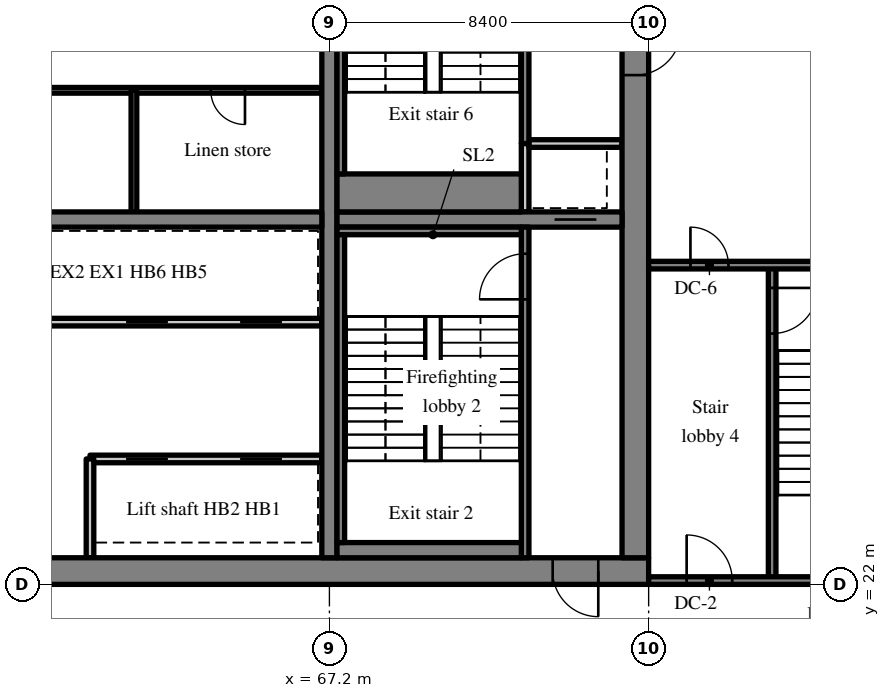
"""IFC4 building model, lengths in metres.
Left out: names, types, materials, properties, quantities, classifications, styles, units other than length and angle.
Written with IfcOpenShell. Run it as: python <this file> out.ifc"""

import sys

from ifc_helpers import new_model, si_unit, direction, frame, frame_2d, origin, place, context, subcontext, project, spatial, rectangle, extrude, source, transform, mapped, element, fill, save


model = new_model("IFC4")
c1 = context("Model", 3, precision=1e-05, world=origin(), true_north=direction((0.0, 1.0)))
c2 = subcontext(c1, "Body", "Model", "MODEL_VIEW")
j1 = project(units=[si_unit("LENGTHUNIT", "METRE"), si_unit("PLANEANGLEUNIT", "RADIAN")], contexts=[c1])
p1 = place(None, origin())
s1 = spatial("IfcSite", under=j1, at=p1, CompositionType="ELEMENT")
p2 = place(p1, origin())
s2 = spatial("IfcBuilding", under=s1, at=p2, CompositionType="ELEMENT")
p3 = place(p2, frame((0.0, 0.0, 189.6)))
s3 = spatial("IfcBuildingStorey", under=s2, at=p3, CompositionType="ELEMENT", Elevation=189.6)
m1 = source(origin(), c2, "Body", "SweptSolid", [
    extrude(rectangle(XDim=50.4, YDim=0.7, at=frame_2d((25.2, 0.0))), origin(), (0.0, 0.0, 1.0), 3.52),
])
p4 = place(p3, frame((25.2, 22.35, 0.0), z_axis=(0.0, 0.0, 1.0), x_axis=(1.0, 0.0, 0.0)))
e1 = element("IfcWall", 1, at=p4, inside=s3, PredefinedType="SHEAR", context=c2, shape_type="MappedRepresentation", body=[
    mapped(m1, transform((0.0, 0.0, 0.0), scale=1.0)),
])
m2 = source(origin(), c2, "Body", "SweptSolid", [
    extrude(rectangle(XDim=1.8, YDim=2.1, at=frame_2d((0.9, 1.05))), frame((0.0, 0.36, 0.0), z_axis=(0.0, -1.0, 0.0), x_axis=(1.0, 0.0, 0.0)), (0.0, 0.0, 1.0), 0.72),
])
p5 = place(p4, frame((15.9, 0.0, 0.0)))
e2 = element("IfcOpeningElement", 2, at=p5, cuts=e1, PredefinedType="OPENING", context=c2, shape_type="MappedRepresentation", body=[
    mapped(m2, transform((0.0, 0.0, 0.0), scale=1.0)),
])
m3 = source(origin(), c2, "Body", "SweptSolid", [
    extrude(rectangle(XDim=0.9, YDim=2.1, at=frame_2d((0.45, 1.05))), frame((0.0, 0.36, 0.0), z_axis=(0.0, -1.0, 0.0), x_axis=(1.0, 0.0, 0.0)), (0.0, 0.0, 1.0), 0.72),
])
p6 = place(p4, frame((9.7, 0.0, 0.0)))
e3 = element("IfcOpeningElement", 3, at=p6, cuts=e1, PredefinedType="OPENING", context=c2, shape_type="MappedRepresentation", body=[
    mapped(m3, transform((0.0, 0.0, 0.0), scale=1.0)),
])
p7 = place(p4, frame((21.5, 0.0, 0.0)))
e4 = element("IfcOpeningElement", 4, at=p7, cuts=e1, PredefinedType="OPENING", context=c2, shape_type="MappedRepresentation", body=[
    mapped(m3, transform((0.0, 0.0, 0.0), scale=1.0)),
])
p8 = place(p4, frame((32.7, 0.0, 0.0)))
e5 = element("IfcOpeningElement", 5, at=p8, cuts=e1, PredefinedType="OPENING", context=c2, shape_type="MappedRepresentation", body=[
    mapped(m2, transform((0.0, 0.0, 0.0), scale=1.0)),
])
m4 = source(origin(), c2, "Body", "SweptSolid", [
    extrude(rectangle(XDim=1.2, YDim=2.1, at=frame_2d((0.6, 1.05))), frame((0.0, 0.36, 0.0), z_axis=(0.0, -1.0, 0.0), x_axis=(1.0, 0.0, 0.0)), (0.0, 0.0, 1.0), 0.72),
])
p9 = place(p4, frame((6.475, 0.0, 0.0)))
e6 = element("IfcOpeningElement", 6, at=p9, cuts=e1, PredefinedType="OPENING", context=c2, shape_type="MappedRepresentation", body=[
    mapped(m4, transform((0.0, 0.0, 0.0), scale=1.0)),
])
p10 = place(p4, frame((47.875, 0.0, 0.0)))
e7 = element("IfcOpeningElement", 7, at=p10, cuts=e1, PredefinedType="OPENING", context=c2, shape_type="MappedRepresentation", body=[
    mapped(m4, transform((0.0, 0.0, 0.0), scale=1.0)),
])
m5 = source(origin(), c2, "Body", "SweptSolid", [
    extrude(rectangle(XDim=18.6, YDim=0.7, at=frame_2d((9.3, 0.0))), origin(), (0.0, 0.0, 1.0), 3.52),
])
p11 = place(p3, frame((75.25, 22.7, 0.0), z_axis=(0.0, 0.0, 1.0), x_axis=(0.0, 1.0, 0.0)))
e8 = element("IfcWall", 8, at=p11, inside=s3, PredefinedType="SHEAR", context=c2, shape_type="MappedRepresentation", body=[
    mapped(m5, transform((0.0, 0.0, 0.0), scale=1.0)),
])
p12 = place(p11, frame((12.7, 0.0, 0.0)))
e9 = element("IfcOpeningElement", 9, at=p12, cuts=e8, PredefinedType="OPENING", context=c2, shape_type="MappedRepresentation", body=[
    mapped(m4, transform((0.0, 0.0, 0.0), scale=1.0)),
])
m6 = source(origin(), c2, "Body", "SweptSolid", [
    extrude(rectangle(XDim=18.6, YDim=0.4, at=frame_2d((9.3, 0.0))), origin(), (0.0, 0.0, 1.0), 3.52),
])
p13 = place(p3, frame((67.2, 22.7, 0.0), z_axis=(0.0, 0.0, 1.0), x_axis=(0.0, 1.0, 0.0)))
e10 = element("IfcWall", 10, at=p13, inside=s3, PredefinedType="SHEAR", context=c2, shape_type="MappedRepresentation", body=[
    mapped(m6, transform((0.0, 0.0, 0.0), scale=1.0)),
])
m7 = source(origin(), c2, "Body", "SweptSolid", [
    extrude(rectangle(XDim=16.4, YDim=0.4, at=frame_2d((8.2, 0.0))), origin(), (0.0, 0.0, 1.0), 3.52),
])
p14 = place(p3, frame((50.6, 31.6, 0.0), z_axis=(0.0, 0.0, 1.0), x_axis=(1.0, 0.0, 0.0)))
e11 = element("IfcWall", 11, at=p14, inside=s3, PredefinedType="SHEAR", context=c2, shape_type="MappedRepresentation", body=[
    mapped(m7, transform((0.0, 0.0, 0.0), scale=1.0)),
])
m8 = source(origin(), c2, "Body", "SweptSolid", [
    extrude(rectangle(XDim=1.0, YDim=2.1, at=frame_2d((0.5, 1.05))), frame((0.0, 0.21, 0.0), z_axis=(0.0, -1.0, 0.0), x_axis=(1.0, 0.0, 0.0)), (0.0, 0.0, 1.0), 0.42),
])
p15 = place(p14, frame((0.6, 0.0, 0.0)))
e12 = element("IfcOpeningElement", 12, at=p15, cuts=e11, PredefinedType="OPENING", context=c2, shape_type="MappedRepresentation", body=[
    mapped(m8, transform((0.0, 0.0, 0.0), scale=1.0)),
])
m9 = source(origin(), c2, "Body", "SweptSolid", [
    extrude(rectangle(XDim=7.5, YDim=0.4, at=frame_2d((3.75, 0.0))), origin(), (0.0, 0.0, 1.0), 3.52),
])
p16 = place(p3, frame((67.4, 31.6, 0.0), z_axis=(0.0, 0.0, 1.0), x_axis=(1.0, 0.0, 0.0)))
e13 = element("IfcWall", 13, at=p16, inside=s3, PredefinedType="SHEAR", context=c2, shape_type="MappedRepresentation", body=[
    mapped(m9, transform((0.0, 0.0, 0.0), scale=1.0)),
])
m10 = source(origin(), c2, "Body", "SweptSolid", [
    extrude(rectangle(XDim=1.1, YDim=2.1, at=frame_2d((0.55, 1.05))), frame((0.0, 0.21, 0.0), z_axis=(0.0, -1.0, 0.0), x_axis=(1.0, 0.0, 0.0)), (0.0, 0.0, 1.0), 0.42),
])
p17 = place(p16, frame((5.725, 0.0, 0.0)))
e14 = element("IfcOpeningElement", 14, at=p17, cuts=e13, PredefinedType="OPENING", context=c2, shape_type="MappedRepresentation", body=[
    mapped(m10, transform((0.0, 0.0, 0.0), scale=1.0)),
])
m11 = source(origin(), c2, "Body", "SweptSolid", [
    extrude(rectangle(XDim=6.1, YDim=0.2, at=frame_2d((3.05, 0.0))), origin(), (0.0, 0.0, 1.0), 3.52),
])
p18 = place(p3, frame((67.0, 25.3, 0.0), z_axis=(0.0, 0.0, 1.0), x_axis=(-1.0, 0.0, 0.0)))
e15 = element("IfcWall", 15, at=p18, inside=s3, PredefinedType="SOLIDWALL", context=c2, shape_type="MappedRepresentation", body=[
    mapped(m11, transform((0.0, 0.0, 0.0), scale=1.0)),
])
m12 = source(origin(), c2, "Body", "SweptSolid", [
    extrude(rectangle(XDim=1.1, YDim=2.1, at=frame_2d((0.55, 1.05))), frame((0.0, 0.11, 0.0), z_axis=(0.0, -1.0, 0.0), x_axis=(1.0, 0.0, 0.0)), (0.0, 0.0, 1.0), 0.22),
])
p19 = place(p18, frame((1.05, 0.0, 0.0)))
e16 = element("IfcOpeningElement", 16, at=p19, cuts=e15, PredefinedType="OPENING", context=c2, shape_type="MappedRepresentation", body=[
    mapped(m12, transform((0.0, 0.0, 0.0), scale=1.0)),
])
p20 = place(p18, frame((4.05, 0.0, 0.0)))
e17 = element("IfcOpeningElement", 17, at=p20, cuts=e15, PredefinedType="OPENING", context=c2, shape_type="MappedRepresentation", body=[
    mapped(m12, transform((0.0, 0.0, 0.0), scale=1.0)),
])
m13 = source(origin(), c2, "Body", "SweptSolid", [
    extrude(rectangle(XDim=12.1, YDim=0.2, at=frame_2d((6.05, 0.0))), origin(), (0.0, 0.0, 1.0), 3.52),
])
p21 = place(p3, frame((67.0, 28.9, 0.0), z_axis=(0.0, 0.0, 1.0), x_axis=(-1.0, 0.0, 0.0)))
e18 = element("IfcWall", 18, at=p21, inside=s3, PredefinedType="SOLIDWALL", context=c2, shape_type="MappedRepresentation", body=[
    mapped(m13, transform((0.0, 0.0, 0.0), scale=1.0)),
])
p22 = place(p21, frame((1.05, 0.0, 0.0)))
e19 = element("IfcOpeningElement", 19, at=p22, cuts=e18, PredefinedType="OPENING", context=c2, shape_type="MappedRepresentation", body=[
    mapped(m12, transform((0.0, 0.0, 0.0), scale=1.0)),
])
p23 = place(p21, frame((4.05, 0.0, 0.0)))
e20 = element("IfcOpeningElement", 20, at=p23, cuts=e18, PredefinedType="OPENING", context=c2, shape_type="MappedRepresentation", body=[
    mapped(m12, transform((0.0, 0.0, 0.0), scale=1.0)),
])
m14 = source(origin(), c2, "Body", "SweptSolid", [
    extrude(rectangle(XDim=2.6, YDim=0.2, at=frame_2d((1.3, 0.0))), origin(), (0.0, 0.0, 1.0), 3.52),
])
p24 = place(p3, frame((60.9, 22.7, 0.0), z_axis=(0.0, 0.0, 1.0), x_axis=(0.0, 1.0, 0.0)))
e21 = element("IfcWall", 21, at=p24, inside=s3, PredefinedType="SOLIDWALL", context=c2, shape_type="MappedRepresentation", body=[
    mapped(m14, transform((0.0, 0.0, 0.0), scale=1.0)),
])
m15 = source(origin(), c2, "Body", "SweptSolid", [
    extrude(rectangle(XDim=14.2, YDim=0.15, at=frame_2d((7.1, 0.0))), origin(), (0.0, 0.0, 1.0), 3.52),
])
p25 = place(p3, frame((67.0, 35.0, 0.0), z_axis=(0.0, 0.0, 1.0), x_axis=(-1.0, 0.0, 0.0)))
e22 = element("IfcWall", 22, at=p25, inside=s3, PredefinedType="PARTITIONING", context=c2, shape_type="MappedRepresentation", body=[
    mapped(m15, transform((0.0, 0.0, 0.0), scale=1.0)),
])
m16 = source(origin(), c2, "Body", "SweptSolid", [
    extrude(rectangle(XDim=0.9, YDim=2.1, at=frame_2d((0.45, 1.05))), frame((0.0, 0.085, 0.0), z_axis=(0.0, -1.0, 0.0), x_axis=(1.0, 0.0, 0.0)), (0.0, 0.0, 1.0), 0.17),
])
p26 = place(p25, frame((2.022, 0.0, 0.0)))
e23 = element("IfcOpeningElement", 23, at=p26, cuts=e22, PredefinedType="OPENING", context=c2, shape_type="MappedRepresentation", body=[
    mapped(m16, transform((0.0, 0.0, 0.0), scale=1.0)),
])
p27 = place(p25, frame((9.084, 0.0, 0.0)))
e24 = element("IfcOpeningElement", 24, at=p27, cuts=e22, PredefinedType="OPENING", context=c2, shape_type="MappedRepresentation", body=[
    mapped(m16, transform((0.0, 0.0, 0.0), scale=1.0)),
])
m17 = source(origin(), c2, "Body", "SweptSolid", [
    extrude(rectangle(XDim=3.2, YDim=0.15, at=frame_2d((1.6, 0.0))), origin(), (0.0, 0.0, 1.0), 3.52),
])
p28 = place(p3, frame((62.056, 31.8, 0.0), z_axis=(0.0, 0.0, 1.0), x_axis=(0.0, 1.0, 0.0)))
e25 = element("IfcWall", 25, at=p28, inside=s3, PredefinedType="PARTITIONING", context=c2, shape_type="MappedRepresentation", body=[
    mapped(m17, transform((0.0, 0.0, 0.0), scale=1.0)),
])
m18 = source(origin(), c2, "Body", "SweptSolid", [
    extrude(rectangle(XDim=8.7, YDim=0.2, at=frame_2d((4.35, 0.0))), origin(), (0.0, 0.0, 1.0), 3.52),
])
p29 = place(p3, frame((72.35, 22.7, 0.0), z_axis=(0.0, 0.0, 1.0), x_axis=(0.0, 1.0, 0.0)))
e26 = element("IfcWall", 26, at=p29, inside=s3, PredefinedType="SOLIDWALL", context=c2, shape_type="MappedRepresentation", body=[
    mapped(m18, transform((0.0, 0.0, 0.0), scale=1.0)),
])
m19 = source(origin(), c2, "Body", "SweptSolid", [
    extrude(rectangle(XDim=1.2, YDim=2.1, at=frame_2d((0.6, 1.05))), frame((0.0, 0.11, 0.0), z_axis=(0.0, -1.0, 0.0), x_axis=(1.0, 0.0, 0.0)), (0.0, 0.0, 1.0), 0.22),
])
p30 = place(p29, frame((6.8, 0.0, 0.0)))
e27 = element("IfcOpeningElement", 27, at=p30, cuts=e26, PredefinedType="OPENING", context=c2, shape_type="MappedRepresentation", body=[
    mapped(m19, transform((0.0, 0.0, 0.0), scale=1.0)),
])
m20 = source(origin(), c2, "Body", "SweptSolid", [
    extrude(rectangle(XDim=1.8, YDim=0.2, at=frame_2d((0.9, 0.0))), origin(), (0.0, 0.0, 1.0), 3.52),
])
p31 = place(p3, frame((72.35, 31.8, 0.0), z_axis=(0.0, 0.0, 1.0), x_axis=(0.0, 1.0, 0.0)))
e28 = element("IfcWall", 28, at=p31, inside=s3, PredefinedType="SOLIDWALL", context=c2, shape_type="MappedRepresentation", body=[
    mapped(m20, transform((0.0, 0.0, 0.0), scale=1.0)),
])
m21 = source(origin(), c2, "Body", "SweptSolid", [
    extrude(rectangle(XDim=2.45, YDim=0.2, at=frame_2d((1.225, 0.0))), origin(), (0.0, 0.0, 1.0), 3.52),
])
p32 = place(p3, frame((72.45, 33.6, 0.0), z_axis=(0.0, 0.0, 1.0), x_axis=(1.0, 0.0, 0.0)))
e29 = element("IfcWall", 29, at=p32, inside=s3, PredefinedType="SOLIDWALL", context=c2, shape_type="MappedRepresentation", body=[
    mapped(m21, transform((0.0, 0.0, 0.0), scale=1.0)),
])
m22 = source(origin(), c2, "Body", "SweptSolid", [
    extrude(rectangle(XDim=7.7, YDim=0.2, at=frame_2d((3.85, 0.0))), origin(), (0.0, 0.0, 1.0), 3.52),
])
p33 = place(p3, frame((72.35, 33.6, 0.0), z_axis=(0.0, 0.0, 1.0), x_axis=(0.0, 1.0, 0.0)))
e30 = element("IfcWall", 30, at=p33, inside=s3, PredefinedType="SOLIDWALL", context=c2, shape_type="MappedRepresentation", body=[
    mapped(m22, transform((0.0, 0.0, 0.0), scale=1.0)),
])
m23 = source(origin(), c2, "Body", "SweptSolid", [
    extrude(rectangle(XDim=1.8, YDim=2.1, at=frame_2d((0.9, 1.05))), frame((0.0, 0.11, 0.0), z_axis=(0.0, -1.0, 0.0), x_axis=(1.0, 0.0, 0.0)), (0.0, 0.0, 1.0), 0.22),
])
p34 = place(p33, frame((5.3, 0.0, 0.0)))
e31 = element("IfcOpeningElement", 31, at=p34, cuts=e30, PredefinedType="OPENING", context=c2, shape_type="MappedRepresentation", body=[
    mapped(m23, transform((0.0, 0.0, 0.0), scale=1.0)),
])
m24 = source(origin(), c2, "Body", "SweptSolid", [
    extrude(rectangle(XDim=8.3, YDim=0.2, at=frame_2d((4.15, 0.0))), origin(), (0.0, 0.0, 1.0), 3.52),
])
p35 = place(p3, frame((78.85, 22.1, 0.0), z_axis=(0.0, 0.0, 1.0), x_axis=(0.0, 1.0, 0.0)))
e32 = element("IfcWall", 32, at=p35, inside=s3, PredefinedType="SOLIDWALL", context=c2, shape_type="MappedRepresentation", body=[
    mapped(m24, transform((0.0, 0.0, 0.0), scale=1.0)),
])
p36 = place(p35, frame((6.5, 0.0, 0.0)))
e33 = element("IfcOpeningElement", 33, at=p36, cuts=e32, PredefinedType="OPENING", context=c2, shape_type="MappedRepresentation", body=[
    mapped(m19, transform((0.0, 0.0, 0.0), scale=1.0)),
])
m25 = source(origin(), c2, "Body", "SweptSolid", [
    extrude(rectangle(XDim=8.25, YDim=0.2, at=frame_2d((4.125, 0.0))), origin(), (0.0, 0.0, 1.0), 3.52),
])
p37 = place(p3, frame((83.85, 22.1, 0.0), z_axis=(0.0, 0.0, 1.0), x_axis=(-1.0, 0.0, 0.0)))
e34 = element("IfcWall", 34, at=p37, inside=s3, PredefinedType="SOLIDWALL", context=c2, shape_type="MappedRepresentation", body=[
    mapped(m25, transform((0.0, 0.0, 0.0), scale=1.0)),
])
p38 = place(p37, frame((6.05, 0.0, 0.0)))
e35 = element("IfcOpeningElement", 35, at=p38, cuts=e34, PredefinedType="OPENING", context=c2, shape_type="MappedRepresentation", body=[
    mapped(m19, transform((0.0, 0.0, 0.0), scale=1.0)),
])
p39 = place(p3, frame((83.85, 30.4, 0.0), z_axis=(0.0, 0.0, 1.0), x_axis=(-1.0, 0.0, 0.0)))
e36 = element("IfcWall", 36, at=p39, inside=s3, PredefinedType="SOLIDWALL", context=c2, shape_type="MappedRepresentation", body=[
    mapped(m25, transform((0.0, 0.0, 0.0), scale=1.0)),
])
m26 = source(origin(), c2, "Body", "SweptSolid", [
    extrude(rectangle(XDim=1.0, YDim=2.1, at=frame_2d((0.5, 1.05))), frame((0.0, 0.11, 0.0), z_axis=(0.0, -1.0, 0.0), x_axis=(1.0, 0.0, 0.0)), (0.0, 0.0, 1.0), 0.22),
])
p40 = place(p39, frame((6.15, 0.0, 0.0)))
e37 = element("IfcOpeningElement", 37, at=p40, cuts=e36, PredefinedType="OPENING", context=c2, shape_type="MappedRepresentation", body=[
    mapped(m26, transform((0.0, 0.0, 0.0), scale=1.0)),
])
m27 = source(origin(), c2, "Body", "SweptSolid", [
    extrude(rectangle(XDim=4.85, YDim=0.4, at=frame_2d((2.425, 0.0))), origin(), (0.0, 0.0, 1.0), 3.52),
])
p41 = place(p3, frame((67.4, 22.9, 0.0), z_axis=(0.0, 0.0, 1.0), x_axis=(1.0, 0.0, 0.0)))
e38 = element("IfcWall", 38, at=p41, inside=s3, PredefinedType="SOLIDWALL", context=c2, shape_type="MappedRepresentation", body=[
    mapped(m27, transform((0.0, 0.0, 0.0), scale=1.0)),
])
m28 = source(origin(), c2, "Body", "SweptSolid", [
    extrude(rectangle(XDim=4.85, YDim=0.2, at=frame_2d((2.425, 0.0))), origin(), (0.0, 0.0, 1.0), 3.52),
])
p42 = place(p3, frame((67.4, 31.3, 0.0), z_axis=(0.0, 0.0, 1.0), x_axis=(1.0, 0.0, 0.0)))
e39 = element("IfcWall", 39, at=p42, inside=s3, PredefinedType="SOLIDWALL", context=c2, shape_type="MappedRepresentation", body=[
    mapped(m28, transform((0.0, 0.0, 0.0), scale=1.0)),
])
m29 = source(origin(), c2, "Body", "SweptSolid", [
    extrude(rectangle(XDim=8.1, YDim=0.2, at=frame_2d((4.05, 0.0))), origin(), (0.0, 0.0, 1.0), 3.52),
])
p43 = place(p3, frame((67.5, 23.1, 0.0), z_axis=(0.0, 0.0, 1.0), x_axis=(0.0, 1.0, 0.0)))
e40 = element("IfcWall", 40, at=p43, inside=s3, PredefinedType="SOLIDWALL", context=c2, shape_type="MappedRepresentation", body=[
    mapped(m29, transform((0.0, 0.0, 0.0), scale=1.0)),
])
m30 = source(origin(), c2, "Body", "SweptSolid", [
    extrude(rectangle(XDim=4.85, YDim=1.0, at=frame_2d((2.425, 0.0))), origin(), (0.0, 0.0, 1.0), 3.52),
])
p44 = place(p3, frame((67.4, 32.3, 0.0), z_axis=(0.0, 0.0, 1.0), x_axis=(1.0, 0.0, 0.0)))
e41 = element("IfcWall", 41, at=p44, inside=s3, PredefinedType="SOLIDWALL", context=c2, shape_type="MappedRepresentation", body=[
    mapped(m30, transform((0.0, 0.0, 0.0), scale=1.0)),
])
p45 = place(p3, frame((67.5, 32.8, 0.0), z_axis=(0.0, 0.0, 1.0), x_axis=(0.0, 1.0, 0.0)))
e42 = element("IfcWall", 42, at=p45, inside=s3, PredefinedType="SOLIDWALL", context=c2, shape_type="MappedRepresentation", body=[
    mapped(m29, transform((0.0, 0.0, 0.0), scale=1.0)),
])
m31 = source(origin(), c2, "Body", "SweptSolid", [
    extrude(rectangle(XDim=1.1, YDim=2.1, at=frame_2d((0.55, 1.05))), frame((0.0, 0.025, 0.0), z_axis=(0.0, -1.0, 0.0), x_axis=(1.0, 0.0, 0.0)), (0.0, 0.0, 1.0), 0.05),
])
p46 = place(p19, origin())
e43 = element("IfcDoor", 43, at=p46, inside=s3, OperationType="SLIDING_TO_RIGHT", PredefinedType="DOOR", context=c2, shape_type="MappedRepresentation", body=[
    mapped(m31, transform((0.0, 0.0, 0.0), scale=1.0)),
])
fill(e16, e43)
p47 = place(p20, origin())
e44 = element("IfcDoor", 44, at=p47, inside=s3, OperationType="SLIDING_TO_LEFT", PredefinedType="DOOR", context=c2, shape_type="MappedRepresentation", body=[
    mapped(m31, transform((0.0, 0.0, 0.0), scale=1.0)),
])
fill(e17, e44)
p48 = place(p22, origin())
e45 = element("IfcDoor", 45, at=p48, inside=s3, OperationType="SLIDING_TO_RIGHT", PredefinedType="DOOR", context=c2, shape_type="MappedRepresentation", body=[
    mapped(m31, transform((0.0, 0.0, 0.0), scale=1.0)),
])
fill(e19, e45)
p49 = place(p23, origin())
e46 = element("IfcDoor", 46, at=p49, inside=s3, OperationType="SLIDING_TO_LEFT", PredefinedType="DOOR", context=c2, shape_type="MappedRepresentation", body=[
    mapped(m31, transform((0.0, 0.0, 0.0), scale=1.0)),
])
fill(e20, e46)
m32 = source(origin(), c2, "Body", "SweptSolid", [
    extrude(rectangle(XDim=0.9, YDim=2.1, at=frame_2d((0.45, 1.05))), frame((0.0, 0.025, 0.0), z_axis=(0.0, -1.0, 0.0), x_axis=(1.0, 0.0, 0.0)), (0.0, 0.0, 1.0), 0.05),
])
p50 = place(p26, origin())
e47 = element("IfcDoor", 47, at=p50, inside=s3, OperationType="SINGLE_SWING_LEFT", PredefinedType="DOOR", context=c2, shape_type="MappedRepresentation", body=[
    mapped(m32, transform((0.0, 0.0, 0.0), scale=1.0)),
])
fill(e23, e47)
m33 = source(origin(), c2, "Body", "SweptSolid", [
    extrude(rectangle(XDim=1.2, YDim=2.1, at=frame_2d((0.6, 1.05))), frame((0.0, 0.025, 0.0), z_axis=(0.0, -1.0, 0.0), x_axis=(1.0, 0.0, 0.0)), (0.0, 0.0, 1.0), 0.05),
])
p51 = place(p30, origin())
e48 = element("IfcDoor", 48, at=p51, inside=s3, OperationType="SINGLE_SWING_LEFT", PredefinedType="DOOR", context=c2, shape_type="MappedRepresentation", body=[
    mapped(m33, transform((0.0, 0.0, 0.0), scale=1.0)),
])
fill(e27, e48)
m34 = source(origin(), c2, "Body", "SweptSolid", [
    extrude(rectangle(XDim=1.2, YDim=2.1, at=frame_2d((0.6, 1.05))), frame((0.0, 0.275, 0.0), z_axis=(0.0, -1.0, 0.0), x_axis=(1.0, 0.0, 0.0)), (0.0, 0.0, 1.0), 0.05),
])
p52 = place(p10, origin())
e49 = element("IfcDoor", 49, at=p52, inside=s3, OperationType="SINGLE_SWING_RIGHT", PredefinedType="DOOR", context=c2, shape_type="MappedRepresentation", body=[
    mapped(m34, transform((0.0, 0.0, 0.0), scale=1.0)),
])
fill(e7, e49)
p53 = place(p17, origin())
e50 = element("IfcDoor", 50, at=p53, inside=s3, OperationType="SLIDING_TO_RIGHT", PredefinedType="DOOR", context=c2, shape_type="MappedRepresentation", body=[
    mapped(m31, transform((0.0, 0.0, 0.0), scale=1.0)),
])
fill(e14, e50)
p54 = place(p12, origin())
e51 = element("IfcDoor", 51, at=p54, inside=s3, OperationType="SINGLE_SWING_RIGHT", PredefinedType="DOOR", context=c2, shape_type="MappedRepresentation", body=[
    mapped(m33, transform((0.0, 0.0, 0.0), scale=1.0)),
])
fill(e9, e51)
p55 = place(p36, origin())
e52 = element("IfcDoor", 52, at=p55, inside=s3, OperationType="SINGLE_SWING_RIGHT", PredefinedType="DOOR", context=c2, shape_type="MappedRepresentation", body=[
    mapped(m33, transform((0.0, 0.0, 0.0), scale=1.0)),
])
fill(e33, e52)
p56 = place(p38, origin())
e53 = element("IfcDoor", 53, at=p56, inside=s3, OperationType="SINGLE_SWING_RIGHT", PredefinedType="DOOR", context=c2, shape_type="MappedRepresentation", body=[
    mapped(m33, transform((0.0, 0.0, 0.0), scale=1.0)),
])
fill(e35, e53)
m35 = source(origin(), c2, "Body", "SweptSolid", [
    extrude(rectangle(XDim=1.0, YDim=2.1, at=frame_2d((0.5, 1.05))), frame((0.0, 0.025, 0.0), z_axis=(0.0, -1.0, 0.0), x_axis=(1.0, 0.0, 0.0)), (0.0, 0.0, 1.0), 0.05),
])
p57 = place(p40, origin())
e54 = element("IfcDoor", 54, at=p57, inside=s3, OperationType="SINGLE_SWING_RIGHT", PredefinedType="DOOR", context=c2, shape_type="MappedRepresentation", body=[
    mapped(m35, transform((0.0, 0.0, 0.0), scale=1.0)),
])
fill(e37, e54)
save(model, sys.argv[1])
